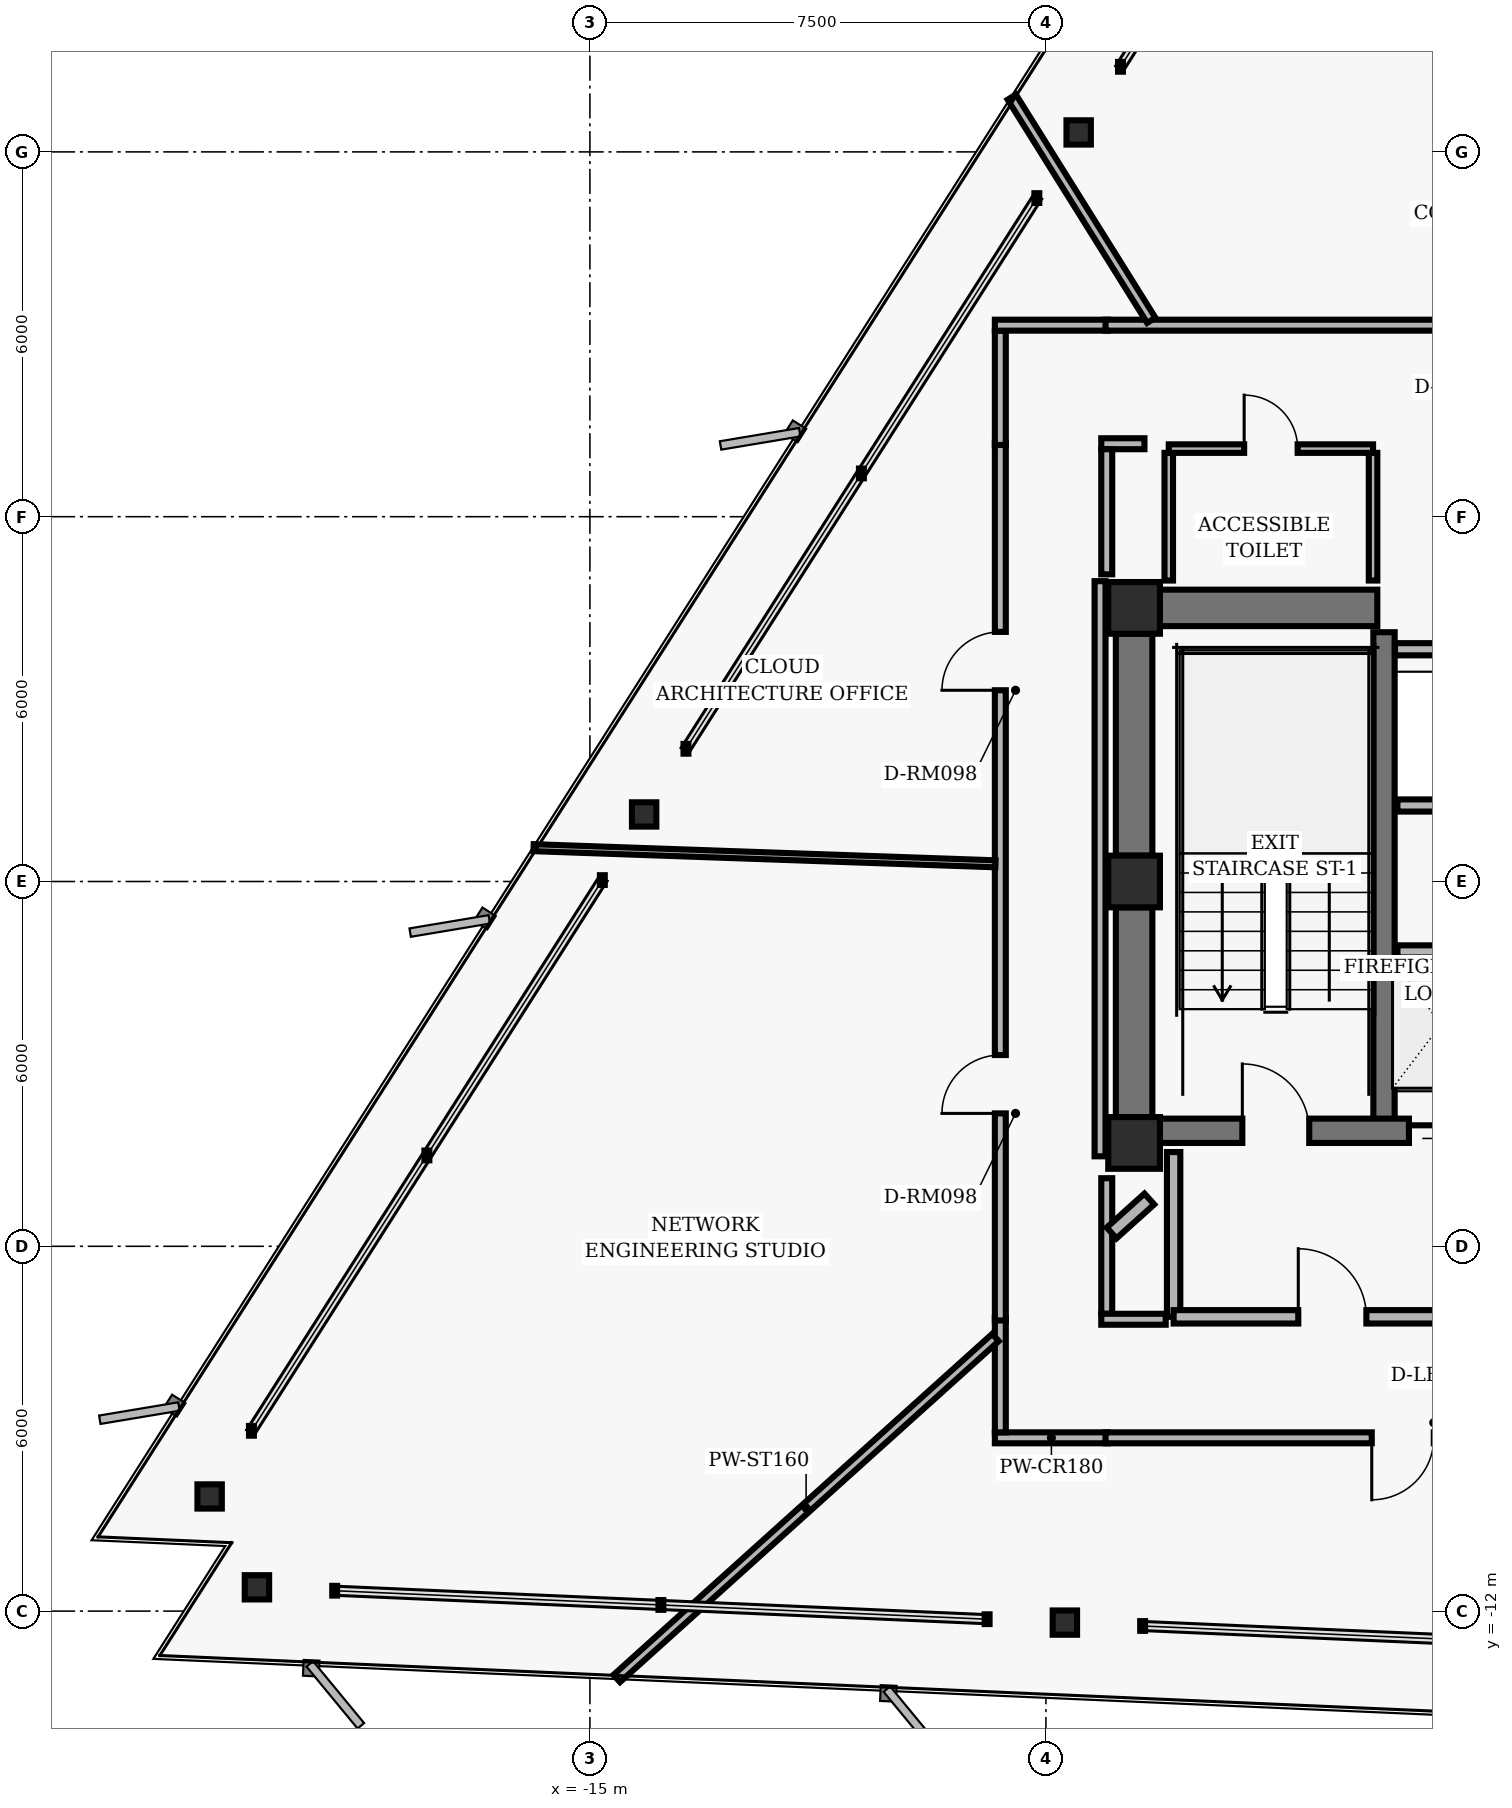
"""IFC4 building model, lengths in metres.
Left out: names, types, materials, properties, quantities, classifications, styles, units other than length and angle.
Written with IfcOpenShell. Run it as: python <this file> out.ifc"""

import sys

from ifc_helpers import new_model, si_unit, direction, frame, frame_2d, origin, origin_2d, place, context, subcontext, project, spatial, rectangle, hollow_rectangle, i_section, extrude, element, fill, save


model = new_model("IFC4")
c1 = context("Model", 3, precision=1e-05, world=origin(), true_north=direction((0.0, 1.0)))
c2 = subcontext(c1, "Body", "Model", "MODEL_VIEW")
j1 = project(units=[si_unit("LENGTHUNIT", "METRE"), si_unit("PLANEANGLEUNIT", "RADIAN")], contexts=[c1])
p1 = place(None, origin())
s1 = spatial("IfcSite", under=j1, at=p1, CompositionType="ELEMENT")
p2 = place(p1, origin())
s2 = spatial("IfcBuilding", under=s1, at=p2, CompositionType="ELEMENT")
p3 = place(p2, frame((0.0, 0.0, 138.08)))
s3 = spatial("IfcBuildingStorey", under=s2, at=p3, CompositionType="ELEMENT", Elevation=138.08)
for number, where, z_axis, x_axis in (
    (1, (-6.05, 4.5, 0.0), (0.0, 0.0, 1.0), (1.0, 0.0, 0.0)),
    (2, (-6.05, 0.0, 0.0), (0.0, 0.0, 1.0), (1.0, 0.0, 0.0)),
    (3, (-6.05, -4.3, 0.0), (0.0, 0.0, 1.0), (1.0, 0.0, 0.0)),
):
    element("IfcColumn", number, at=place(p3, frame(where, z_axis=z_axis, x_axis=x_axis)), inside=s3, PredefinedType="COLUMN", context=c2, shape_type="SweptSolid", body=[
        extrude(hollow_rectangle(XDim=0.85, YDim=0.85, WallThickness=0.055, InnerFilletRadius=0.02, OuterFilletRadius=0.04, at=origin_2d()), origin(), (0.0, 0.0, 1.0), 3.04),
    ])
p4 = place(p3, frame((-6.05, 0.425, 0.0), z_axis=(0.0, 0.0, 1.0), x_axis=(0.0, 1.0, 0.0)))
e4 = element("IfcWall", 4, at=p4, inside=s3, PredefinedType="SHEAR", context=c2, shape_type="SweptSolid", body=[
    extrude(rectangle(XDim=3.65, YDim=0.6, at=frame_2d((1.825, 0.0))), origin(), (0.0, 0.0, 1.0), 2.788),
])
p5 = place(p3, frame((-6.05, -3.875, 0.0), z_axis=(0.0, 0.0, 1.0), x_axis=(0.0, 1.0, 0.0)))
e5 = element("IfcWall", 5, at=p5, inside=s3, PredefinedType="SHEAR", context=c2, shape_type="SweptSolid", body=[
    extrude(rectangle(XDim=3.45, YDim=0.6, at=frame_2d((1.725, 0.0))), origin(), (0.0, 0.0, 1.0), 2.788),
])
p6 = place(p3, frame((-1.94, -4.1, 0.0), z_axis=(0.0, 0.0, 1.0), x_axis=(0.0, 1.0, 0.0)))
e6 = element("IfcWall", 6, at=p6, inside=s3, PredefinedType="SHEAR", context=c2, shape_type="SweptSolid", body=[
    extrude(rectangle(XDim=8.2, YDim=0.35, at=frame_2d((4.1, 0.0))), origin(), (0.0, 0.0, 1.0), 2.788),
])
p7 = place(p3, frame((-5.625, -4.1, 0.0), z_axis=(0.0, 0.0, 1.0), x_axis=(1.0, 0.0, 0.0)))
e7 = element("IfcWall", 7, at=p7, inside=s3, PredefinedType="SHEAR", context=c2, shape_type="SweptSolid", body=[
    extrude(rectangle(XDim=11.25, YDim=0.4, at=frame_2d((5.625, 0.0))), origin(), (0.0, 0.0, 1.0), 2.788),
])
p8 = place(p7, frame((1.355, 0.0, 0.0)))
e8 = element("IfcOpeningElement", 8, at=p8, cuts=e7, PredefinedType="OPENING", context=c2, shape_type="SweptSolid", body=[
    extrude(rectangle(XDim=1.1, YDim=2.04, at=frame_2d((0.55, 1.02))), frame((0.0, 0.21, 0.0), z_axis=(0.0, -1.0, 0.0), x_axis=(1.0, 0.0, 0.0)), (0.0, 0.0, 1.0), 0.42),
])
p9 = place(p7, frame((8.795, 0.0, 0.0)))
e9 = element("IfcOpeningElement", 9, at=p9, cuts=e7, PredefinedType="OPENING", context=c2, shape_type="SweptSolid", body=[
    extrude(rectangle(XDim=1.1, YDim=2.04, at=frame_2d((0.55, 1.02))), frame((0.0, 0.21, 0.0), z_axis=(0.0, -1.0, 0.0), x_axis=(1.0, 0.0, 0.0)), (0.0, 0.0, 1.0), 0.42),
])
p10 = place(p7, frame((4.095, 0.0, 0.0)))
e10 = element("IfcOpeningElement", 10, at=p10, cuts=e7, PredefinedType="OPENING", context=c2, shape_type="SweptSolid", body=[
    extrude(rectangle(XDim=1.06, YDim=2.04, at=frame_2d((0.53, 1.02))), frame((0.0, 0.21, 0.0), z_axis=(0.0, -1.0, 0.0), x_axis=(1.0, 0.0, 0.0)), (0.0, 0.0, 1.0), 0.42),
])
p11 = place(p7, frame((6.095, 0.0, 0.0)))
e11 = element("IfcOpeningElement", 11, at=p11, cuts=e7, PredefinedType="OPENING", context=c2, shape_type="SweptSolid", body=[
    extrude(rectangle(XDim=1.06, YDim=2.04, at=frame_2d((0.53, 1.02))), frame((0.0, 0.21, 0.0), z_axis=(0.0, -1.0, 0.0), x_axis=(1.0, 0.0, 0.0)), (0.0, 0.0, 1.0), 0.42),
])
p12 = place(p3, frame((-5.625, 4.5, 0.0), z_axis=(0.0, 0.0, 1.0), x_axis=(1.0, 0.0, 0.0)))
e12 = element("IfcWall", 12, at=p12, inside=s3, PredefinedType="SHEAR", context=c2, shape_type="SweptSolid", body=[
    extrude(rectangle(XDim=3.575, YDim=0.6, at=frame_2d((1.788, 0.0))), origin(), (0.0, 0.0, 1.0), 2.788),
])
for number, where, z_axis, x_axis in (
    (13, (-6.962, 12.32, 0.0), (0.0, 0.0, 1.0), (1.0, 0.0, 0.0)),
    (14, (-14.108, 1.103, 0.0), (0.0, 0.0, 1.0), (1.0, 0.0, 0.0)),
    (15, (-21.254, -10.114, 0.0), (0.0, 0.0, 1.0), (1.0, 0.0, 0.0)),
    (16, (-20.476, -11.609, 0.0), (0.0, 0.0, 1.0), (1.0, 0.0, 0.0)),
    (17, (-7.188, -12.189, 0.0), (0.0, 0.0, 1.0), (1.0, 0.0, 0.0)),
):
    element("IfcColumn", number, at=place(p3, frame(where, z_axis=z_axis, x_axis=x_axis)), inside=s3, PredefinedType="COLUMN", context=c2, shape_type="SweptSolid", body=[
        extrude(i_section(OverallWidth=0.401, OverallDepth=0.399, WebThickness=0.025, FlangeThickness=0.04, FilletRadius=0.018, at=origin_2d()), origin(), (0.0, 0.0, 1.0), 3.04),
    ])
p13 = place(p3, frame((-1.72, -1.15, 0.0), z_axis=(0.0, 0.0, 1.0), x_axis=(1.0, 0.0, 0.0)))
e18 = element("IfcWall", 18, at=p13, inside=s3, PredefinedType="PARTITIONING", context=c2, shape_type="SweptSolid", body=[
    extrude(rectangle(XDim=3.44, YDim=0.2, at=frame_2d((1.72, 0.0))), origin(), (0.0, 0.0, 1.0), 2.763),
])
p14 = place(p3, frame((-5.4, -7.16, 0.0), z_axis=(0.0, 0.0, 1.0), x_axis=(0.0, 1.0, 0.0)))
e19 = element("IfcWall", 19, at=p14, inside=s3, PredefinedType="PARTITIONING", context=c2, shape_type="SweptSolid", body=[
    extrude(rectangle(XDim=2.71, YDim=0.22, at=frame_2d((1.355, 0.0))), origin(), (0.0, 0.0, 1.0), 2.763),
])
p15 = place(p3, frame((-5.4, -7.16, 0.0), z_axis=(0.0, 0.0, 1.0), x_axis=(1.0, 0.0, 0.0)))
e20 = element("IfcWall", 20, at=p15, inside=s3, PredefinedType="PARTITIONING", context=c2, shape_type="SweptSolid", body=[
    extrude(rectangle(XDim=5.4, YDim=0.22, at=frame_2d((2.7, 0.0))), origin(), (0.0, 0.0, 1.0), 2.33),
])
p16 = place(p15, frame((2.05, 0.0, 0.0)))
e21 = element("IfcOpeningElement", 21, at=p16, cuts=e20, PredefinedType="OPENING", context=c2, shape_type="SweptSolid", body=[
    extrude(rectangle(XDim=1.12, YDim=2.02, at=frame_2d((0.56, 1.01))), frame((0.0, 0.12, 0.0), z_axis=(0.0, -1.0, 0.0), x_axis=(1.0, 0.0, 0.0)), (0.0, 0.0, 1.0), 0.24),
])
p17 = place(p3, frame((-1.72, 1.25, 0.0), z_axis=(0.0, 0.0, 1.0), x_axis=(1.0, 0.0, 0.0)))
e22 = element("IfcWall", 22, at=p17, inside=s3, PredefinedType="PARTITIONING", context=c2, shape_type="SweptSolid", body=[
    extrude(rectangle(XDim=3.44, YDim=0.2, at=frame_2d((1.72, 0.0))), origin(), (0.0, 0.0, 1.0), 2.763),
])
p18 = place(p3, frame((-1.76, 3.82, 0.0), z_axis=(0.0, 0.0, 1.0), x_axis=(1.0, 0.0, 0.0)))
e23 = element("IfcWall", 23, at=p18, inside=s3, PredefinedType="PARTITIONING", context=c2, shape_type="SweptSolid", body=[
    extrude(rectangle(XDim=3.52, YDim=0.2, at=frame_2d((1.76, 0.0))), origin(), (0.0, 0.0, 1.0), 2.763),
])
for number, where, z_axis, x_axis in (
    (24, (-5.48, 4.95, 0.0), (0.0, 0.0, 1.0), (0.0, 1.0, 0.0)),
    (25, (-2.12, 4.95, 0.0), (0.0, 0.0, 1.0), (0.0, 1.0, 0.0)),
):
    element("IfcWall", number, at=place(p3, frame(where, z_axis=z_axis, x_axis=x_axis)), inside=s3, PredefinedType="PARTITIONING", context=c2, shape_type="SweptSolid", body=[
        extrude(rectangle(XDim=2.1, YDim=0.14, at=frame_2d((1.05, 0.0))), origin(), (0.0, 0.0, 1.0), 2.763),
    ])
p19 = place(p3, frame((-5.48, 7.12, 0.0), z_axis=(0.0, 0.0, 1.0), x_axis=(1.0, 0.0, 0.0)))
e26 = element("IfcWall", 26, at=p19, inside=s3, PredefinedType="PARTITIONING", context=c2, shape_type="SweptSolid", body=[
    extrude(rectangle(XDim=3.36, YDim=0.14, at=frame_2d((1.68, 0.0))), origin(), (0.0, 0.0, 1.0), 2.33),
])
p20 = place(p19, frame((1.24, 0.0, 0.0)))
e27 = element("IfcOpeningElement", 27, at=p20, cuts=e26, PredefinedType="OPENING", context=c2, shape_type="SweptSolid", body=[
    extrude(rectangle(XDim=0.88, YDim=2.02, at=frame_2d((0.44, 1.01))), frame((0.0, 0.08, 0.0), z_axis=(0.0, -1.0, 0.0), x_axis=(1.0, 0.0, 0.0)), (0.0, 0.0, 1.0), 0.16),
])
p21 = place(p3, frame((-6.48, -9.15, 0.0), z_axis=(0.0, 0.0, 1.0), x_axis=(-1.0, 0.0, 0.0)))
e28 = element("IfcWall", 28, at=p21, inside=s3, PredefinedType="PARTITIONING", context=c2, shape_type="SweptSolid", body=[
    extrude(rectangle(XDim=1.86, YDim=0.18, at=frame_2d((0.93, 0.0))), origin(), (0.0, 0.0, 1.0), 2.33),
])
p22 = place(p3, frame((-8.25, -9.06, 0.0), z_axis=(0.0, 0.0, 1.0), x_axis=(0.0, 1.0, 0.0)))
e29 = element("IfcWall", 29, at=p22, inside=s3, PredefinedType="PARTITIONING", context=c2, shape_type="SweptSolid", body=[
    extrude(rectangle(XDim=1.88, YDim=0.18, at=frame_2d((0.94, 0.0))), origin(), (0.0, 0.0, 1.0), 2.763),
])
p23 = place(p3, frame((-8.25, -7.22, 0.0), z_axis=(0.0, 0.0, 1.0), x_axis=(0.0, 1.0, 0.0)))
e30 = element("IfcWall", 30, at=p23, inside=s3, PredefinedType="PARTITIONING", context=c2, shape_type="SweptSolid", body=[
    extrude(rectangle(XDim=14.44, YDim=0.18, at=frame_2d((7.22, 0.0))), origin(), (0.0, 0.0, 1.0), 2.763),
])
p24 = place(p23, frame((3.406, 0.0, 0.0)))
e31 = element("IfcOpeningElement", 31, at=p24, cuts=e30, PredefinedType="OPENING", context=c2, shape_type="SweptSolid", body=[
    extrude(rectangle(XDim=0.96, YDim=2.02, at=frame_2d((0.48, 1.01))), frame((0.0, 0.1, 0.0), z_axis=(0.0, -1.0, 0.0), x_axis=(1.0, 0.0, 0.0)), (0.0, 0.0, 1.0), 0.2),
])
p25 = place(p23, frame((10.365, 0.0, 0.0)))
e32 = element("IfcOpeningElement", 32, at=p25, cuts=e30, PredefinedType="OPENING", context=c2, shape_type="SweptSolid", body=[
    extrude(rectangle(XDim=0.96, YDim=2.02, at=frame_2d((0.48, 1.01))), frame((0.0, 0.1, 0.0), z_axis=(0.0, -1.0, 0.0), x_axis=(1.0, 0.0, 0.0)), (0.0, 0.0, 1.0), 0.2),
])
p26 = place(p3, frame((-8.25, 7.18, 0.0), z_axis=(0.0, 0.0, 1.0), x_axis=(0.0, 1.0, 0.0)))
e33 = element("IfcWall", 33, at=p26, inside=s3, PredefinedType="PARTITIONING", context=c2, shape_type="SweptSolid", body=[
    extrude(rectangle(XDim=1.88, YDim=0.18, at=frame_2d((0.94, 0.0))), origin(), (0.0, 0.0, 1.0), 2.763),
])
p27 = place(p3, frame((-8.34, 9.15, 0.0), z_axis=(0.0, 0.0, 1.0), x_axis=(1.0, 0.0, 0.0)))
e34 = element("IfcWall", 34, at=p27, inside=s3, PredefinedType="PARTITIONING", context=c2, shape_type="SweptSolid", body=[
    extrude(rectangle(XDim=1.86, YDim=0.18, at=frame_2d((0.93, 0.0))), origin(), (0.0, 0.0, 1.0), 2.763),
])
p28 = place(p3, frame((-6.52, 9.15, 0.0), z_axis=(0.0, 0.0, 1.0), x_axis=(1.0, 0.0, 0.0)))
e35 = element("IfcWall", 35, at=p28, inside=s3, PredefinedType="PARTITIONING", context=c2, shape_type="SweptSolid", body=[
    extrude(rectangle(XDim=16.572, YDim=0.18, at=frame_2d((8.286, 0.0))), origin(), (0.0, 0.0, 1.0), 2.33),
])
p29 = place(p28, frame((5.789, 0.0, 0.0)))
e36 = element("IfcOpeningElement", 36, at=p29, cuts=e35, PredefinedType="OPENING", context=c2, shape_type="SweptSolid", body=[
    extrude(rectangle(XDim=1.02, YDim=2.02, at=frame_2d((0.51, 1.01))), frame((0.0, 0.1, 0.0), z_axis=(0.0, -1.0, 0.0), x_axis=(1.0, 0.0, 0.0)), (0.0, 0.0, 1.0), 0.2),
])
p30 = place(p3, frame((10.98, -9.15, 0.0), z_axis=(0.0, 0.0, 1.0), x_axis=(-1.0, 0.0, 0.0)))
e37 = element("IfcWall", 37, at=p30, inside=s3, PredefinedType="PARTITIONING", context=c2, shape_type="SweptSolid", body=[
    extrude(rectangle(XDim=17.5, YDim=0.18, at=frame_2d((8.75, 0.0))), origin(), (0.0, 0.0, 1.0), 2.33),
])
p31 = place(p30, frame((12.102, 0.0, 0.0)))
e38 = element("IfcOpeningElement", 38, at=p31, cuts=e37, PredefinedType="OPENING", context=c2, shape_type="SweptSolid", body=[
    extrude(rectangle(XDim=1.02, YDim=2.02, at=frame_2d((0.51, 1.01))), frame((0.0, 0.1, 0.0), z_axis=(0.0, -1.0, 0.0), x_axis=(1.0, 0.0, 0.0)), (0.0, 0.0, 1.0), 0.2),
])
p32 = place(p30, frame((3.639, 0.0, 0.0)))
e39 = element("IfcOpeningElement", 39, at=p32, cuts=e37, PredefinedType="OPENING", context=c2, shape_type="SweptSolid", body=[
    extrude(rectangle(XDim=0.96, YDim=2.02, at=frame_2d((0.48, 1.01))), frame((0.0, 0.1, 0.0), z_axis=(0.0, -1.0, 0.0), x_axis=(1.0, 0.0, 0.0)), (0.0, 0.0, 1.0), 0.2),
])
p33 = place(p3, frame((-5.88, 7.2, 0.0), z_axis=(0.0, 0.0, 1.0), x_axis=(-1.0, 0.0, 0.0)))
e40 = element("IfcWall", 40, at=p33, inside=s3, PredefinedType="PARTITIONING", context=c2, shape_type="SweptSolid", body=[
    extrude(rectangle(XDim=0.71, YDim=0.18, at=frame_2d((0.355, 0.0))), origin(), (0.0, 0.0, 1.0), 2.33),
])
p34 = place(p3, frame((-6.5, 7.11, 0.0), z_axis=(0.0, 0.0, 1.0), x_axis=(0.0, -1.0, 0.0)))
e41 = element("IfcWall", 41, at=p34, inside=s3, PredefinedType="PARTITIONING", context=c2, shape_type="SweptSolid", body=[
    extrude(rectangle(XDim=2.058, YDim=0.18, at=frame_2d((1.029, 0.0))), origin(), (0.0, 0.0, 1.0), 2.132),
])
p35 = place(p3, frame((-6.61, 4.94, 0.0), z_axis=(0.0, 0.0, 1.0), x_axis=(0.0, -1.0, 0.0)))
e42 = element("IfcWall", 42, at=p35, inside=s3, PredefinedType="PARTITIONING", context=c2, shape_type="SweptSolid", body=[
    extrude(rectangle(XDim=9.46, YDim=0.18, at=frame_2d((4.73, 0.0))), origin(), (0.0, 0.0, 1.0), 2.763),
])
p36 = place(p3, frame((-6.5, -4.88, 0.0), z_axis=(0.0, 0.0, 1.0), x_axis=(0.0, -1.0, 0.0)))
e43 = element("IfcWall", 43, at=p36, inside=s3, PredefinedType="PARTITIONING", context=c2, shape_type="SweptSolid", body=[
    extrude(rectangle(XDim=2.23, YDim=0.18, at=frame_2d((1.115, 0.0))), origin(), (0.0, 0.0, 1.0), 2.132),
])
p37 = place(p3, frame((-6.59, -7.2, 0.0), z_axis=(0.0, 0.0, 1.0), x_axis=(1.0, 0.0, 0.0)))
e44 = element("IfcWall", 44, at=p37, inside=s3, PredefinedType="PARTITIONING", context=c2, shape_type="SweptSolid", body=[
    extrude(rectangle(XDim=1.06, YDim=0.18, at=frame_2d((0.53, 0.0))), origin(), (0.0, 0.0, 1.0), 2.33),
])
p38 = place(p3, frame((-5.8, -5.222, 0.0), z_axis=(0.0, 0.0, 1.0), x_axis=(-0.743163145085, -0.669110259813, 0.0)))
e45 = element("IfcWall", 45, at=p38, inside=s3, PredefinedType="PARTITIONING", context=c2, shape_type="SweptSolid", body=[
    extrude(rectangle(XDim=0.834, YDim=0.24, at=frame_2d((0.417, 0.0))), origin(), (0.0, 0.0, 1.0), 2.763),
])
p39 = place(p3, frame((-8.33, -7.5, 0.0), z_axis=(0.0, 0.0, 1.0), x_axis=(-0.743147832275, -0.669127266957, 0.0)))
e46 = element("IfcWall", 46, at=p39, inside=s3, PredefinedType="PARTITIONING", context=c2, shape_type="SweptSolid", body=[
    extrude(rectangle(XDim=8.381, YDim=0.16, at=frame_2d((4.19, 0.0))), origin(), (0.0, 0.0, 1.0), 2.763),
])
p40 = place(p3, frame((-5.768, 9.23, 0.0), z_axis=(0.0, 0.0, 1.0), x_axis=(-0.529887412725, 0.848067998356, 0.0)))
e47 = element("IfcWall", 47, at=p40, inside=s3, PredefinedType="PARTITIONING", context=c2, shape_type="SweptSolid", body=[
    extrude(rectangle(XDim=4.329, YDim=0.16, at=frame_2d((2.165, 0.0))), origin(), (0.0, 0.0, 1.0), 2.763),
])
p41 = place(p3, frame((-8.33, 0.291, 0.0), z_axis=(0.0, 0.0, 1.0), x_axis=(-0.999391414835, 0.034882659784, 0.0)))
e48 = element("IfcWall", 48, at=p41, inside=s3, PredefinedType="MOVABLE", context=c2, shape_type="SweptSolid", body=[
    extrude(rectangle(XDim=7.601, YDim=0.115, at=frame_2d((3.8, 0.0))), origin(), (0.0, 0.0, 1.0), 2.132),
])
p42 = place(p8, origin())
e49 = element("IfcDoor", 49, at=p42, inside=s3, OperationType="SINGLE_SWING_LEFT", PredefinedType="DOOR", context=c2, shape_type="SweptSolid", body=[
    extrude(rectangle(XDim=1.1, YDim=2.04, at=frame_2d((0.55, 1.02))), frame((0.0, 0.025, 0.0), z_axis=(0.0, -1.0, 0.0), x_axis=(1.0, 0.0, 0.0)), (0.0, 0.0, 1.0), 0.05),
])
fill(e8, e49)
p43 = place(p10, origin())
e50 = element("IfcDoor", 50, at=p43, inside=s3, OperationType="SLIDING_TO_LEFT", PredefinedType="DOOR", context=c2, shape_type="SweptSolid", body=[
    extrude(rectangle(XDim=1.06, YDim=2.04, at=frame_2d((0.53, 1.02))), frame((0.0, 0.025, 0.0), z_axis=(0.0, -1.0, 0.0), x_axis=(1.0, 0.0, 0.0)), (0.0, 0.0, 1.0), 0.05),
])
fill(e10, e50)
p44 = place(p16, origin())
e51 = element("IfcDoor", 51, at=p44, inside=s3, OperationType="SINGLE_SWING_LEFT", PredefinedType="DOOR", context=c2, shape_type="SweptSolid", body=[
    extrude(rectangle(XDim=1.12, YDim=2.02, at=frame_2d((0.56, 1.01))), frame((0.0, 0.025, 0.0), z_axis=(0.0, -1.0, 0.0), x_axis=(1.0, 0.0, 0.0)), (0.0, 0.0, 1.0), 0.05),
])
fill(e21, e51)
p45 = place(p20, origin())
e52 = element("IfcDoor", 52, at=p45, inside=s3, OperationType="SINGLE_SWING_LEFT", PredefinedType="DOOR", context=c2, shape_type="SweptSolid", body=[
    extrude(rectangle(XDim=0.88, YDim=2.02, at=frame_2d((0.44, 1.01))), frame((0.0, 0.025, 0.0), z_axis=(0.0, -1.0, 0.0), x_axis=(1.0, 0.0, 0.0)), (0.0, 0.0, 1.0), 0.05),
])
fill(e27, e52)
p46 = place(p24, origin())
e53 = element("IfcDoor", 53, at=p46, inside=s3, OperationType="SINGLE_SWING_LEFT", PredefinedType="DOOR", context=c2, shape_type="SweptSolid", body=[
    extrude(rectangle(XDim=0.96, YDim=2.02, at=frame_2d((0.48, 1.01))), frame((0.0, 0.025, 0.0), z_axis=(0.0, -1.0, 0.0), x_axis=(1.0, 0.0, 0.0)), (0.0, 0.0, 1.0), 0.05),
])
fill(e31, e53)
p47 = place(p31, origin())
e54 = element("IfcDoor", 54, at=p47, inside=s3, OperationType="SINGLE_SWING_RIGHT", PredefinedType="DOOR", context=c2, shape_type="SweptSolid", body=[
    extrude(rectangle(XDim=1.02, YDim=2.02, at=frame_2d((0.51, 1.01))), frame((0.0, 0.025, 0.0), z_axis=(0.0, -1.0, 0.0), x_axis=(1.0, 0.0, 0.0)), (0.0, 0.0, 1.0), 0.05),
])
fill(e38, e54)
p48 = place(p25, origin())
e55 = element("IfcDoor", 55, at=p48, inside=s3, OperationType="SINGLE_SWING_LEFT", PredefinedType="DOOR", context=c2, shape_type="SweptSolid", body=[
    extrude(rectangle(XDim=0.96, YDim=2.02, at=frame_2d((0.48, 1.01))), frame((0.0, 0.025, 0.0), z_axis=(0.0, -1.0, 0.0), x_axis=(1.0, 0.0, 0.0)), (0.0, 0.0, 1.0), 0.05),
])
fill(e32, e55)
save(model, sys.argv[1])
